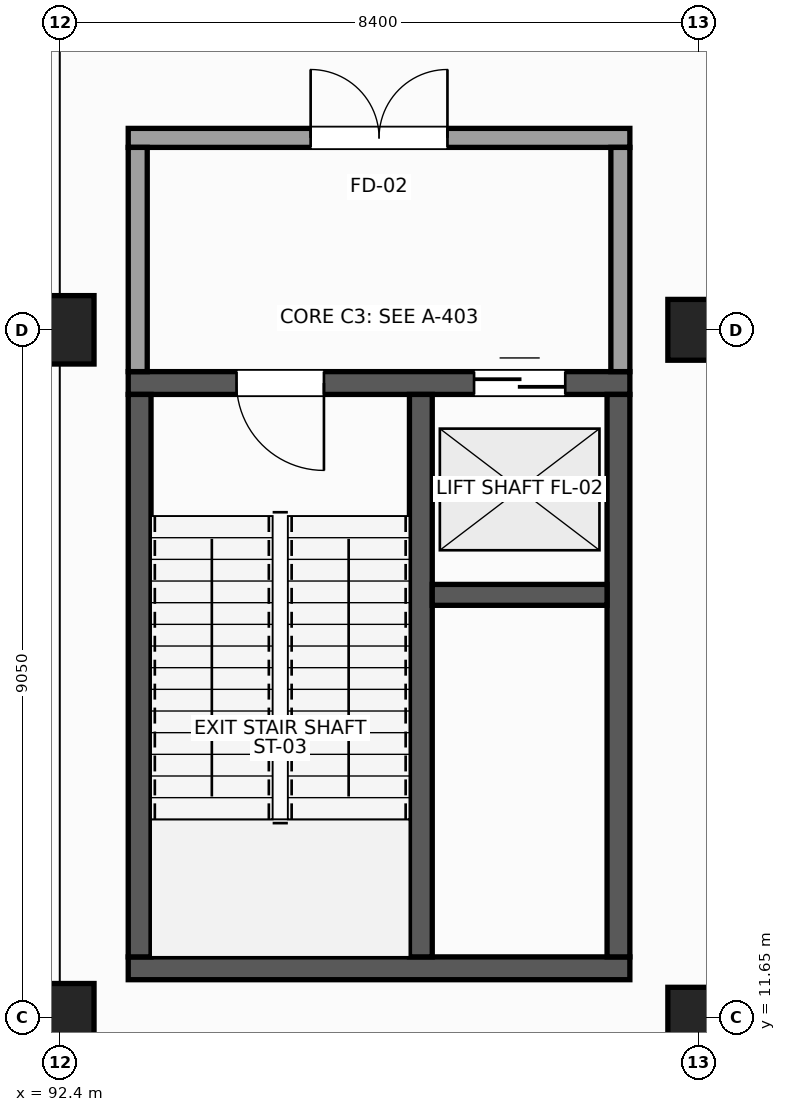
"""IFC4 building model, lengths in metres.
Left out: names, types, materials, properties, quantities, classifications, styles, units other than length and angle.
Written with IfcOpenShell. Run it as: python <this file> out.ifc"""

import sys

from ifc_helpers import new_model, si_unit, direction, frame, frame_2d, origin, origin_2d, place, context, subcontext, project, spatial, rectangle, extrude, element, fill, save


model = new_model("IFC4")
c1 = context("Model", 3, precision=1e-05, world=origin(), true_north=direction((0.0, 1.0)))
c2 = subcontext(c1, "Body", "Model", "MODEL_VIEW")
j1 = project(units=[si_unit("LENGTHUNIT", "METRE"), si_unit("PLANEANGLEUNIT", "RADIAN")], contexts=[c1])
p1 = place(None, origin())
s1 = spatial("IfcSite", under=j1, at=p1, CompositionType="ELEMENT")
p2 = place(p1, origin())
s2 = spatial("IfcBuilding", under=s1, at=p2, CompositionType="ELEMENT")
p3 = place(p2, frame((0.0, 0.0, -5.4)))
s3 = spatial("IfcBuildingStorey", under=s2, at=p3, CompositionType="ELEMENT", Elevation=-5.4)
for number, where, z_axis, x_axis in (
    (1, (92.4, 11.65, -0.4), (0.0, 0.0, 1.0), (1.0, 0.0, 0.0)),
    (2, (92.4, 20.7, -0.4), (0.0, 0.0, 1.0), (1.0, 0.0, 0.0)),
):
    element("IfcColumn", number, at=place(p3, frame(where, z_axis=z_axis, x_axis=x_axis)), inside=s3, PredefinedType="COLUMN", context=c2, shape_type="SweptSolid", body=[
        extrude(rectangle(XDim=0.9, YDim=0.9, at=origin_2d()), origin(), (0.0, 0.0, 1.0), 5.8),
    ])
for number, where, z_axis, x_axis in (
    (3, (100.8, 11.65, -0.4), (0.0, 0.0, 1.0), (1.0, 0.0, 0.0)),
    (4, (100.8, 20.7, -0.4), (0.0, 0.0, 1.0), (1.0, 0.0, 0.0)),
):
    element("IfcColumn", number, at=place(p3, frame(where, z_axis=z_axis, x_axis=x_axis)), inside=s3, PredefinedType="COLUMN", context=c2, shape_type="SweptSolid", body=[
        extrude(rectangle(XDim=0.8, YDim=0.8, at=origin_2d()), origin(), (0.0, 0.0, 1.0), 5.8),
    ])
p4 = place(p3, frame((93.3, 12.3, 0.0), z_axis=(0.0, 0.0, 1.0), x_axis=(1.0, 0.0, 0.0)))
e5 = element("IfcWall", 5, at=p4, inside=s3, PredefinedType="SHEAR", context=c2, shape_type="SweptSolid", body=[
    extrude(rectangle(XDim=6.6, YDim=0.3, at=frame_2d((3.3, 0.0))), origin(), (0.0, 0.0, 1.0), 5.08),
])
p5 = place(p3, frame((93.3, 20.0, 0.0), z_axis=(0.0, 0.0, 1.0), x_axis=(1.0, 0.0, 0.0)))
e6 = element("IfcWall", 6, at=p5, inside=s3, PredefinedType="SHEAR", context=c2, shape_type="SweptSolid", body=[
    extrude(rectangle(XDim=6.6, YDim=0.3, at=frame_2d((3.3, 0.0))), origin(), (0.0, 0.0, 1.0), 5.08),
])
p6 = place(p5, frame((1.425, 0.0, 0.0)))
e7 = element("IfcOpeningElement", 7, at=p6, cuts=e6, PredefinedType="OPENING", context=c2, shape_type="SweptSolid", body=[
    extrude(rectangle(XDim=1.15, YDim=2.2, at=frame_2d((0.575, 1.1))), frame((0.0, 0.16, 0.0), z_axis=(0.0, -1.0, 0.0), x_axis=(1.0, 0.0, 0.0)), (0.0, 0.0, 1.0), 0.32),
])
p7 = place(p5, frame((4.55, 0.0, 0.0)))
e8 = element("IfcOpeningElement", 8, at=p7, cuts=e6, PredefinedType="OPENING", context=c2, shape_type="SweptSolid", body=[
    extrude(rectangle(XDim=1.2, YDim=2.15, at=frame_2d((0.6, 1.075))), frame((0.0, 0.16, 0.0), z_axis=(0.0, -1.0, 0.0), x_axis=(1.0, 0.0, 0.0)), (0.0, 0.0, 1.0), 0.32),
])
for number, where, z_axis, x_axis in (
    (9, (93.45, 12.45, 0.0), (0.0, 0.0, 1.0), (0.0, 1.0, 0.0)),
    (10, (99.75, 12.45, 0.0), (0.0, 0.0, 1.0), (0.0, 1.0, 0.0)),
    (11, (97.15, 12.45, 0.0), (0.0, 0.0, 1.0), (0.0, 1.0, 0.0)),
):
    element("IfcWall", number, at=place(p3, frame(where, z_axis=z_axis, x_axis=x_axis)), inside=s3, PredefinedType="SHEAR", context=c2, shape_type="SweptSolid", body=[
        extrude(rectangle(XDim=7.4, YDim=0.3, at=frame_2d((3.7, 0.0))), origin(), (0.0, 0.0, 1.0), 5.08),
    ])
p8 = place(p3, frame((97.3, 17.213, 0.0), z_axis=(0.0, 0.0, 1.0), x_axis=(1.0, 0.0, 0.0)))
e12 = element("IfcWall", 12, at=p8, inside=s3, PredefinedType="SHEAR", context=c2, shape_type="SweptSolid", body=[
    extrude(rectangle(XDim=2.3, YDim=0.275, at=frame_2d((1.15, 0.0))), origin(), (0.0, 0.0, 1.0), 5.08),
])
p9 = place(p3, frame((93.3, 23.225, 0.0), z_axis=(0.0, 0.0, 1.0), x_axis=(1.0, 0.0, 0.0)))
e13 = element("IfcWall", 13, at=p9, inside=s3, PredefinedType="PARTITIONING", context=c2, shape_type="SweptSolid", body=[
    extrude(rectangle(XDim=6.6, YDim=0.25, at=frame_2d((3.3, 0.0))), origin(), (0.0, 0.0, 1.0), 5.08),
])
p10 = place(p9, frame((2.4, 0.0, 0.0)))
e14 = element("IfcOpeningElement", 14, at=p10, cuts=e13, PredefinedType="OPENING", context=c2, shape_type="SweptSolid", body=[
    extrude(rectangle(XDim=1.8, YDim=2.25, at=frame_2d((0.9, 1.125))), frame((0.0, 0.135, 0.0), z_axis=(0.0, -1.0, 0.0), x_axis=(1.0, 0.0, 0.0)), (0.0, 0.0, 1.0), 0.27),
])
for number, where, z_axis, x_axis in (
    (15, (93.425, 20.15, 0.0), (0.0, 0.0, 1.0), (0.0, 1.0, 0.0)),
    (16, (99.775, 20.15, 0.0), (0.0, 0.0, 1.0), (0.0, 1.0, 0.0)),
):
    element("IfcWall", number, at=place(p3, frame(where, z_axis=z_axis, x_axis=x_axis)), inside=s3, PredefinedType="PARTITIONING", context=c2, shape_type="SweptSolid", body=[
        extrude(rectangle(XDim=2.95, YDim=0.25, at=frame_2d((1.475, 0.0))), origin(), (0.0, 0.0, 1.0), 4.23),
    ])
p11 = place(p6, frame((1.15, 0.0, 0.0), z_axis=(0.0, 0.0, 1.0), x_axis=(-1.0, 0.0, 0.0)))
e17 = element("IfcDoor", 17, at=p11, inside=s3, OperationType="SINGLE_SWING_LEFT", PredefinedType="DOOR", context=c2, shape_type="SweptSolid", body=[
    extrude(rectangle(XDim=1.15, YDim=2.2, at=frame_2d((0.575, 1.1))), frame((0.0, 0.025, 0.0), z_axis=(0.0, -1.0, 0.0), x_axis=(1.0, 0.0, 0.0)), (0.0, 0.0, 1.0), 0.05),
])
fill(e7, e17)
p12 = place(p7, origin())
e18 = element("IfcDoor", 18, at=p12, inside=s3, OperationType="DOUBLE_DOOR_SLIDING", PredefinedType="DOOR", context=c2, shape_type="SweptSolid", body=[
    extrude(rectangle(XDim=1.2, YDim=2.15, at=frame_2d((0.6, 1.075))), frame((0.0, 0.025, 0.0), z_axis=(0.0, -1.0, 0.0), x_axis=(1.0, 0.0, 0.0)), (0.0, 0.0, 1.0), 0.05),
])
fill(e8, e18)
p13 = place(p10, origin())
e19 = element("IfcDoor", 19, at=p13, inside=s3, OperationType="DOUBLE_DOOR_SINGLE_SWING", PredefinedType="DOOR", context=c2, shape_type="SweptSolid", body=[
    extrude(rectangle(XDim=1.8, YDim=2.25, at=frame_2d((0.9, 1.125))), frame((0.0, 0.025, 0.0), z_axis=(0.0, -1.0, 0.0), x_axis=(1.0, 0.0, 0.0)), (0.0, 0.0, 1.0), 0.05),
])
fill(e14, e19)
save(model, sys.argv[1])
